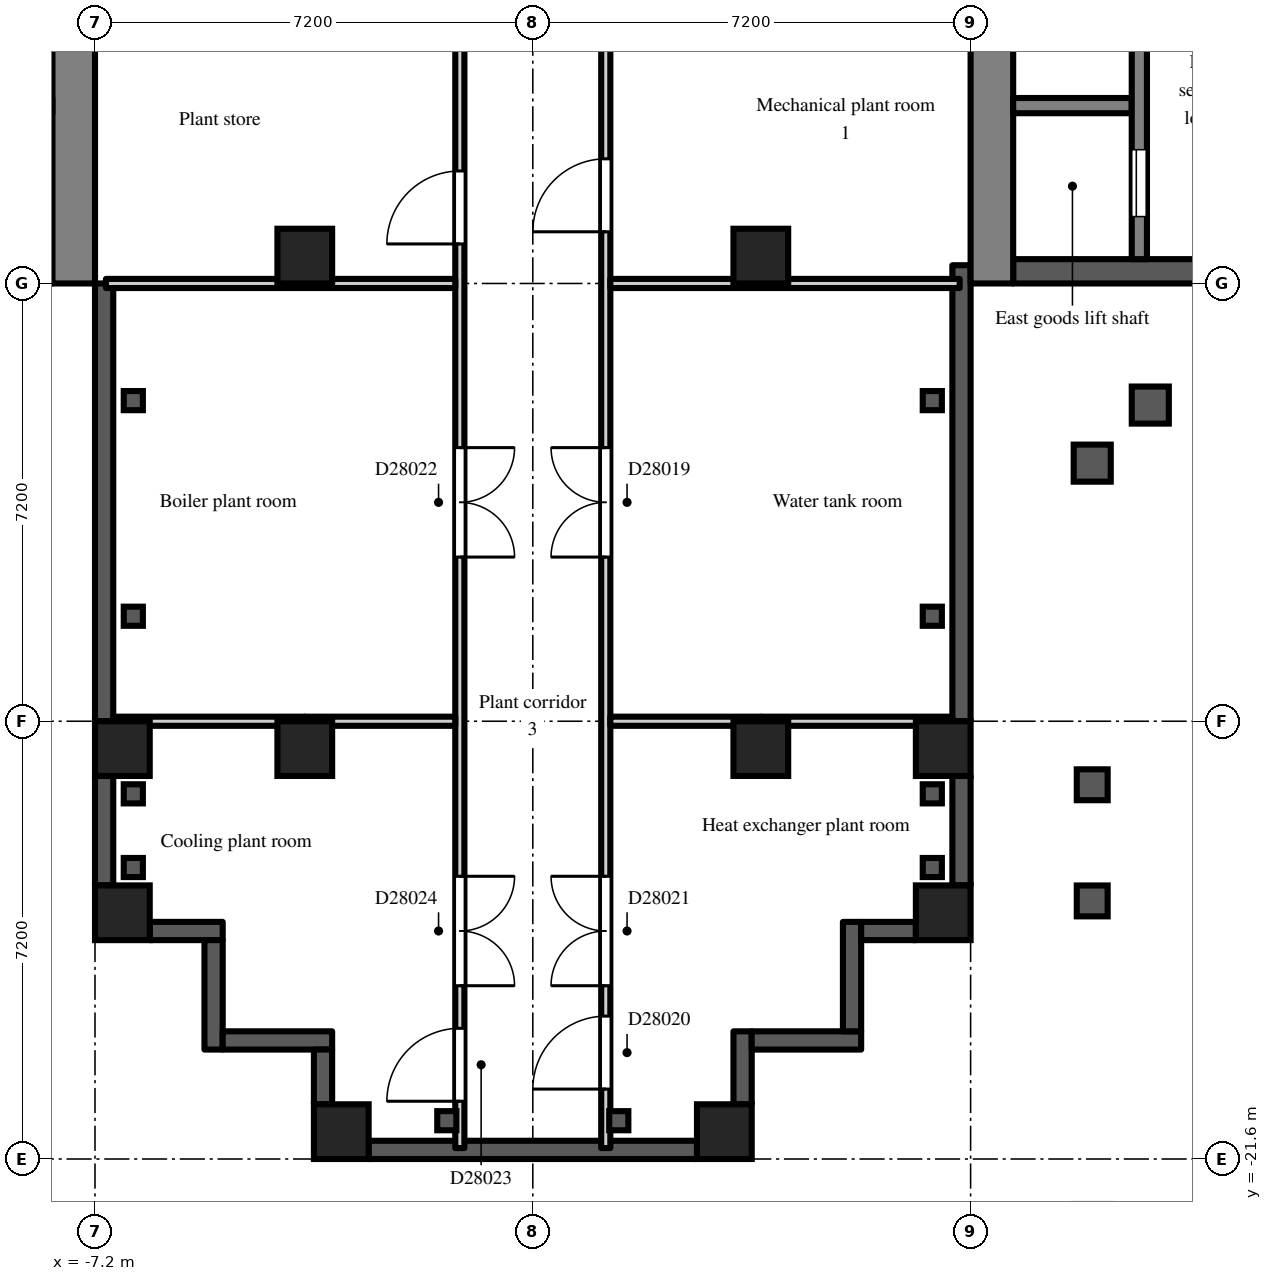
"""IFC4 building model, lengths in metres.
Left out: names, types, materials, properties, quantities, classifications, styles, units other than length and angle.
Written with IfcOpenShell. Run it as: python <this file> out.ifc"""

import sys

from ifc_helpers import new_model, si_unit, direction, frame, frame_2d, origin, origin_2d, place, context, subcontext, project, spatial, rectangle, extrude, element, fill, save


model = new_model("IFC4")
c1 = context("Model", 3, precision=1e-05, world=origin(), true_north=direction((0.0, 1.0)))
c2 = subcontext(c1, "Body", "Model", "MODEL_VIEW")
j1 = project(units=[si_unit("LENGTHUNIT", "METRE"), si_unit("PLANEANGLEUNIT", "RADIAN")], contexts=[c1])
p1 = place(None, origin())
s1 = spatial("IfcSite", under=j1, at=p1, CompositionType="ELEMENT")
p2 = place(p1, origin())
s2 = spatial("IfcBuilding", under=s1, at=p2, CompositionType="ELEMENT")
p3 = place(p2, frame((0.0, 0.0, 194.7)))
s3 = spatial("IfcBuildingStorey", under=s2, at=p3, CompositionType="ELEMENT", Elevation=194.7)
for number, where, z_axis, x_axis in (
    (1, (-6.75, -17.55, 0.0), (0.0, 0.0, 1.0), (1.0, 0.0, 0.0)),
    (2, (-6.75, -14.85, 0.0), (0.0, 0.0, 1.0), (1.0, 0.0, 0.0)),
    (3, (-3.75, -14.85, 0.0), (0.0, 0.0, 1.0), (1.0, 0.0, 0.0)),
    (4, (-3.75, -6.75, 0.0), (0.0, 0.0, 1.0), (1.0, 0.0, 0.0)),
    (5, (-3.15, -21.15, 0.0), (0.0, 0.0, 1.0), (1.0, 0.0, 0.0)),
    (6, (3.15, -21.15, 0.0), (0.0, 0.0, 1.0), (1.0, 0.0, 0.0)),
    (7, (3.75, -14.85, 0.0), (0.0, 0.0, 1.0), (1.0, 0.0, 0.0)),
    (8, (3.75, -6.75, 0.0), (0.0, 0.0, 1.0), (1.0, 0.0, 0.0)),
    (9, (6.75, -17.55, 0.0), (0.0, 0.0, 1.0), (1.0, 0.0, 0.0)),
    (10, (6.75, -14.85, 0.0), (0.0, 0.0, 1.0), (1.0, 0.0, 0.0)),
):
    element("IfcColumn", number, at=place(p3, frame(where, z_axis=z_axis, x_axis=x_axis)), inside=s3, PredefinedType="COLUMN", context=c2, shape_type="SweptSolid", body=[
        extrude(rectangle(XDim=0.9, YDim=0.9, at=origin_2d()), origin(), (0.0, 0.0, 1.0), 4.2),
    ])
p4 = place(p3, frame((-7.05, -7.2, 0.0), z_axis=(0.0, 0.0, 1.0), x_axis=(0.0, -1.0, 0.0)))
e11 = element("IfcWall", 11, at=p4, inside=s3, PredefinedType="SOLIDWALL", context=c2, shape_type="SweptSolid", body=[
    extrude(rectangle(XDim=7.2, YDim=0.3, at=frame_2d((3.6, 0.0))), origin(), (0.0, 0.0, 1.0), 3.8),
])
p5 = place(p3, frame((-7.05, -15.3, 0.0), z_axis=(0.0, 0.0, 1.0), x_axis=(0.0, -1.0, 0.0)))
e12 = element("IfcWall", 12, at=p5, inside=s3, PredefinedType="SOLIDWALL", context=c2, shape_type="SweptSolid", body=[
    extrude(rectangle(XDim=1.8, YDim=0.3, at=frame_2d((0.9, 0.0))), origin(), (0.0, 0.0, 1.0), 3.5),
])
p6 = place(p3, frame((-6.3, -17.85, 0.0), z_axis=(0.0, 0.0, 1.0), x_axis=(1.0, 0.0, 0.0)))
e13 = element("IfcWall", 13, at=p6, inside=s3, PredefinedType="SOLIDWALL", context=c2, shape_type="SweptSolid", body=[
    extrude(rectangle(XDim=1.2, YDim=0.3, at=frame_2d((0.6, 0.0))), origin(), (0.0, 0.0, 1.0), 3.8),
])
for number, where, z_axis, x_axis in (
    (14, (-5.25, -18.0, 0.0), (0.0, 0.0, 1.0), (0.0, -1.0, 0.0)),
    (15, (-5.1, -19.65, 0.0), (0.0, 0.0, 1.0), (1.0, 0.0, 0.0)),
):
    element("IfcWall", number, at=place(p3, frame(where, z_axis=z_axis, x_axis=x_axis)), inside=s3, PredefinedType="SOLIDWALL", context=c2, shape_type="SweptSolid", body=[
        extrude(rectangle(XDim=1.8, YDim=0.3, at=frame_2d((0.9, 0.0))), origin(), (0.0, 0.0, 1.0), 3.8),
    ])
p7 = place(p3, frame((-3.45, -19.8, 0.0), z_axis=(0.0, 0.0, 1.0), x_axis=(0.0, -1.0, 0.0)))
e16 = element("IfcWall", 16, at=p7, inside=s3, PredefinedType="SOLIDWALL", context=c2, shape_type="SweptSolid", body=[
    extrude(rectangle(XDim=0.9, YDim=0.3, at=frame_2d((0.45, 0.0))), origin(), (0.0, 0.0, 1.0), 3.8),
])
p8 = place(p3, frame((-2.7, -21.45, 0.0), z_axis=(0.0, 0.0, 1.0), x_axis=(1.0, 0.0, 0.0)))
e17 = element("IfcWall", 17, at=p8, inside=s3, PredefinedType="SOLIDWALL", context=c2, shape_type="SweptSolid", body=[
    extrude(rectangle(XDim=5.4, YDim=0.3, at=frame_2d((2.7, 0.0))), origin(), (0.0, 0.0, 1.0), 3.5),
])
p9 = place(p3, frame((3.45, -20.7, 0.0), z_axis=(0.0, 0.0, 1.0), x_axis=(0.0, 1.0, 0.0)))
e18 = element("IfcWall", 18, at=p9, inside=s3, PredefinedType="SOLIDWALL", context=c2, shape_type="SweptSolid", body=[
    extrude(rectangle(XDim=1.2, YDim=0.3, at=frame_2d((0.6, 0.0))), origin(), (0.0, 0.0, 1.0), 3.8),
])
p10 = place(p3, frame((3.6, -19.65, 0.0), z_axis=(0.0, 0.0, 1.0), x_axis=(1.0, 0.0, 0.0)))
e19 = element("IfcWall", 19, at=p10, inside=s3, PredefinedType="SOLIDWALL", context=c2, shape_type="SweptSolid", body=[
    extrude(rectangle(XDim=1.8, YDim=0.3, at=frame_2d((0.9, 0.0))), origin(), (0.0, 0.0, 1.0), 3.8),
])
p11 = place(p3, frame((5.25, -19.5, 0.0), z_axis=(0.0, 0.0, 1.0), x_axis=(0.0, 1.0, 0.0)))
e20 = element("IfcWall", 20, at=p11, inside=s3, PredefinedType="SOLIDWALL", context=c2, shape_type="SweptSolid", body=[
    extrude(rectangle(XDim=1.8, YDim=0.3, at=frame_2d((0.9, 0.0))), origin(), (0.0, 0.0, 1.0), 3.8),
])
p12 = place(p3, frame((5.4, -17.85, 0.0), z_axis=(0.0, 0.0, 1.0), x_axis=(1.0, 0.0, 0.0)))
e21 = element("IfcWall", 21, at=p12, inside=s3, PredefinedType="SOLIDWALL", context=c2, shape_type="SweptSolid", body=[
    extrude(rectangle(XDim=0.9, YDim=0.3, at=frame_2d((0.45, 0.0))), origin(), (0.0, 0.0, 1.0), 3.8),
])
p13 = place(p3, frame((7.05, -17.1, 0.0), z_axis=(0.0, 0.0, 1.0), x_axis=(0.0, 1.0, 0.0)))
e22 = element("IfcWall", 22, at=p13, inside=s3, PredefinedType="SOLIDWALL", context=c2, shape_type="SweptSolid", body=[
    extrude(rectangle(XDim=1.8, YDim=0.3, at=frame_2d((0.9, 0.0))), origin(), (0.0, 0.0, 1.0), 3.5),
])
p14 = place(p3, frame((7.05, -14.4, 0.0), z_axis=(0.0, 0.0, 1.0), x_axis=(0.0, 1.0, 0.0)))
e23 = element("IfcWall", 23, at=p14, inside=s3, PredefinedType="SOLIDWALL", context=c2, shape_type="SweptSolid", body=[
    extrude(rectangle(XDim=7.5, YDim=0.3, at=frame_2d((3.75, 0.0))), origin(), (0.0, 0.0, 1.0), 3.8),
])
p15 = place(p3, frame((7.55, -7.2, 0.0), z_axis=(0.0, 0.0, 1.0), x_axis=(0.0, 1.0, 0.0)))
e24 = element("IfcWall", 24, at=p15, inside=s3, PredefinedType="SHEAR", context=c2, shape_type="SweptSolid", body=[
    extrude(rectangle(XDim=14.4, YDim=0.7, at=frame_2d((7.2, 0.0))), origin(), (0.0, 0.0, 1.0), 3.8),
])
p16 = place(p15, frame((6.0, 0.0, 0.0)))
e25 = element("IfcOpeningElement", 25, at=p16, cuts=e24, PredefinedType="OPENING", context=c2, shape_type="SweptSolid", body=[
    extrude(rectangle(XDim=2.4, YDim=2.2, at=frame_2d((1.2, 1.1))), frame((0.0, 0.36, 0.0), z_axis=(0.0, -1.0, 0.0), x_axis=(1.0, 0.0, 0.0)), (0.0, 0.0, 1.0), 0.72),
])
p17 = place(p3, frame((7.9, -7.0, 0.0), z_axis=(0.0, 0.0, 1.0), x_axis=(1.0, 0.0, 0.0)))
e26 = element("IfcWall", 26, at=p17, inside=s3, PredefinedType="SHEAR", context=c2, shape_type="SweptSolid", body=[
    extrude(rectangle(XDim=12.95, YDim=0.4, at=frame_2d((6.475, 0.0))), origin(), (0.0, 0.0, 1.0), 3.8),
])
p18 = place(p3, frame((7.9, -4.275, 0.0), z_axis=(0.0, 0.0, 1.0), x_axis=(1.0, 0.0, 0.0)))
e27 = element("IfcWall", 27, at=p18, inside=s3, PredefinedType="SHEAR", context=c2, shape_type="SweptSolid", body=[
    extrude(rectangle(XDim=1.95, YDim=0.25, at=frame_2d((0.975, 0.0))), origin(), (0.0, 0.0, 1.0), 3.8),
])
p19 = place(p3, frame((9.975, -2.05, 0.0), z_axis=(0.0, 0.0, 1.0), x_axis=(0.0, -1.0, 0.0)))
e28 = element("IfcWall", 28, at=p19, inside=s3, PredefinedType="SHEAR", context=c2, shape_type="SweptSolid", body=[
    extrude(rectangle(XDim=4.75, YDim=0.25, at=frame_2d((2.375, 0.0))), origin(), (0.0, 0.0, 1.0), 3.8),
])
p20 = place(p19, frame((2.95, 0.0, 0.0)))
e29 = element("IfcOpeningElement", 29, at=p20, cuts=e28, PredefinedType="OPENING", context=c2, shape_type="SweptSolid", body=[
    extrude(rectangle(XDim=1.1, YDim=2.1, at=frame_2d((0.55, 1.05))), frame((0.0, 0.135, 0.0), z_axis=(0.0, -1.0, 0.0), x_axis=(1.0, 0.0, 0.0)), (0.0, 0.0, 1.0), 0.27),
])
p21 = place(p3, frame((-7.55, -7.2, 0.0), z_axis=(0.0, 0.0, 1.0), x_axis=(0.0, 1.0, 0.0)))
e30 = element("IfcWall", 30, at=p21, inside=s3, PredefinedType="SHEAR", context=c2, shape_type="SweptSolid", body=[
    extrude(rectangle(XDim=14.4, YDim=0.7, at=frame_2d((7.2, 0.0))), origin(), (0.0, 0.0, 1.0), 3.8),
])
p22 = place(p21, frame((6.0, 0.0, 0.0)))
e31 = element("IfcOpeningElement", 31, at=p22, cuts=e30, PredefinedType="OPENING", context=c2, shape_type="SweptSolid", body=[
    extrude(rectangle(XDim=2.4, YDim=2.2, at=frame_2d((1.2, 1.1))), frame((0.0, 0.36, 0.0), z_axis=(0.0, -1.0, 0.0), x_axis=(1.0, 0.0, 0.0)), (0.0, 0.0, 1.0), 0.72),
])
p23 = place(p3, frame((-6.9, -14.4, 0.0), z_axis=(0.0, 0.0, 1.0), x_axis=(1.0, 0.0, 0.0)))
e32 = element("IfcWall", 32, at=p23, inside=s3, PredefinedType="PARTITIONING", context=c2, shape_type="SweptSolid", body=[
    extrude(rectangle(XDim=3.15, YDim=0.15, at=frame_2d((1.575, 0.0))), origin(), (0.0, 0.0, 1.0), 3.5),
])
p24 = place(p3, frame((-7.02, -7.2, 0.0), z_axis=(0.0, 0.0, 1.0), x_axis=(1.0, 0.0, 0.0)))
e33 = element("IfcWall", 33, at=p24, inside=s3, PredefinedType="PARTITIONING", context=c2, shape_type="SweptSolid", body=[
    extrude(rectangle(XDim=3.27, YDim=0.15, at=frame_2d((1.635, 0.0))), origin(), (0.0, 0.0, 1.0), 3.5),
])
p25 = place(p3, frame((-1.2, -21.42, 0.0), z_axis=(0.0, 0.0, 1.0), x_axis=(0.0, 1.0, 0.0)))
e34 = element("IfcWall", 34, at=p25, inside=s3, PredefinedType="PARTITIONING", context=c2, shape_type="SweptSolid", body=[
    extrude(rectangle(XDim=20.295, YDim=0.15, at=frame_2d((10.147, 0.0))), origin(), (0.0, 0.0, 1.0), 3.8),
])
p26 = place(p25, frame((14.87, 0.0, 0.0)))
e35 = element("IfcOpeningElement", 35, at=p26, cuts=e34, PredefinedType="OPENING", context=c2, shape_type="SweptSolid", body=[
    extrude(rectangle(XDim=1.2, YDim=2.1, at=frame_2d((0.6, 1.05))), frame((0.0, 0.085, 0.0), z_axis=(0.0, -1.0, 0.0), x_axis=(1.0, 0.0, 0.0)), (0.0, 0.0, 1.0), 0.17),
])
p27 = place(p25, frame((19.22, 0.0, 0.0)))
e36 = element("IfcOpeningElement", 36, at=p27, cuts=e34, PredefinedType="OPENING", context=c2, shape_type="SweptSolid", body=[
    extrude(rectangle(XDim=0.9, YDim=2.1, at=frame_2d((0.45, 1.05))), frame((0.0, 0.085, 0.0), z_axis=(0.0, -1.0, 0.0), x_axis=(1.0, 0.0, 0.0)), (0.0, 0.0, 1.0), 0.17),
])
p28 = place(p25, frame((9.72, 0.0, 0.0)))
e37 = element("IfcOpeningElement", 37, at=p28, cuts=e34, PredefinedType="OPENING", context=c2, shape_type="SweptSolid", body=[
    extrude(rectangle(XDim=1.8, YDim=2.1, at=frame_2d((0.9, 1.05))), frame((0.0, 0.085, 0.0), z_axis=(0.0, -1.0, 0.0), x_axis=(1.0, 0.0, 0.0)), (0.0, 0.0, 1.0), 0.17),
])
p29 = place(p25, frame((0.77, 0.0, 0.0)))
e38 = element("IfcOpeningElement", 38, at=p29, cuts=e34, PredefinedType="OPENING", context=c2, shape_type="SweptSolid", body=[
    extrude(rectangle(XDim=1.2, YDim=2.1, at=frame_2d((0.6, 1.05))), frame((0.0, 0.085, 0.0), z_axis=(0.0, -1.0, 0.0), x_axis=(1.0, 0.0, 0.0)), (0.0, 0.0, 1.0), 0.17),
])
p30 = place(p25, frame((2.67, 0.0, 0.0)))
e39 = element("IfcOpeningElement", 39, at=p30, cuts=e34, PredefinedType="OPENING", context=c2, shape_type="SweptSolid", body=[
    extrude(rectangle(XDim=1.8, YDim=2.1, at=frame_2d((0.9, 1.05))), frame((0.0, 0.085, 0.0), z_axis=(0.0, -1.0, 0.0), x_axis=(1.0, 0.0, 0.0)), (0.0, 0.0, 1.0), 0.17),
])
p31 = place(p3, frame((1.2, -21.42, 0.0), z_axis=(0.0, 0.0, 1.0), x_axis=(0.0, 1.0, 0.0)))
e40 = element("IfcWall", 40, at=p31, inside=s3, PredefinedType="PARTITIONING", context=c2, shape_type="SweptSolid", body=[
    extrude(rectangle(XDim=20.295, YDim=0.15, at=frame_2d((10.147, 0.0))), origin(), (0.0, 0.0, 1.0), 3.8),
])
p32 = place(p31, frame((15.07, 0.0, 0.0)))
e41 = element("IfcOpeningElement", 41, at=p32, cuts=e40, PredefinedType="OPENING", context=c2, shape_type="SweptSolid", body=[
    extrude(rectangle(XDim=1.2, YDim=2.1, at=frame_2d((0.6, 1.05))), frame((0.0, 0.085, 0.0), z_axis=(0.0, -1.0, 0.0), x_axis=(1.0, 0.0, 0.0)), (0.0, 0.0, 1.0), 0.17),
])
p33 = place(p31, frame((9.72, 0.0, 0.0)))
e42 = element("IfcOpeningElement", 42, at=p33, cuts=e40, PredefinedType="OPENING", context=c2, shape_type="SweptSolid", body=[
    extrude(rectangle(XDim=1.8, YDim=2.1, at=frame_2d((0.9, 1.05))), frame((0.0, 0.085, 0.0), z_axis=(0.0, -1.0, 0.0), x_axis=(1.0, 0.0, 0.0)), (0.0, 0.0, 1.0), 0.17),
])
p34 = place(p31, frame((0.97, 0.0, 0.0)))
e43 = element("IfcOpeningElement", 43, at=p34, cuts=e40, PredefinedType="OPENING", context=c2, shape_type="SweptSolid", body=[
    extrude(rectangle(XDim=1.2, YDim=2.1, at=frame_2d((0.6, 1.05))), frame((0.0, 0.085, 0.0), z_axis=(0.0, -1.0, 0.0), x_axis=(1.0, 0.0, 0.0)), (0.0, 0.0, 1.0), 0.17),
])
p35 = place(p31, frame((2.67, 0.0, 0.0)))
e44 = element("IfcOpeningElement", 44, at=p35, cuts=e40, PredefinedType="OPENING", context=c2, shape_type="SweptSolid", body=[
    extrude(rectangle(XDim=1.8, YDim=2.1, at=frame_2d((0.9, 1.05))), frame((0.0, 0.085, 0.0), z_axis=(0.0, -1.0, 0.0), x_axis=(1.0, 0.0, 0.0)), (0.0, 0.0, 1.0), 0.17),
])
for number, where, z_axis, x_axis in (
    (45, (1.275, -14.4, 0.0), (0.0, 0.0, 1.0), (1.0, 0.0, 0.0)),
    (46, (1.275, -7.2, 0.0), (0.0, 0.0, 1.0), (1.0, 0.0, 0.0)),
    (47, (-3.75, -14.4, 0.0), (0.0, 0.0, 1.0), (1.0, 0.0, 0.0)),
    (48, (-3.75, -7.2, 0.0), (0.0, 0.0, 1.0), (1.0, 0.0, 0.0)),
):
    element("IfcWall", number, at=place(p3, frame(where, z_axis=z_axis, x_axis=x_axis)), inside=s3, PredefinedType="PARTITIONING", context=c2, shape_type="SweptSolid", body=[
        extrude(rectangle(XDim=2.475, YDim=0.15, at=frame_2d((1.238, 0.0))), origin(), (0.0, 0.0, 1.0), 3.8),
    ])
p36 = place(p3, frame((3.75, -14.4, 0.0), z_axis=(0.0, 0.0, 1.0), x_axis=(1.0, 0.0, 0.0)))
e49 = element("IfcWall", 49, at=p36, inside=s3, PredefinedType="PARTITIONING", context=c2, shape_type="SweptSolid", body=[
    extrude(rectangle(XDim=3.15, YDim=0.15, at=frame_2d((1.575, 0.0))), origin(), (0.0, 0.0, 1.0), 3.5),
])
p37 = place(p3, frame((3.75, -7.2, 0.0), z_axis=(0.0, 0.0, 1.0), x_axis=(1.0, 0.0, 0.0)))
e50 = element("IfcWall", 50, at=p37, inside=s3, PredefinedType="PARTITIONING", context=c2, shape_type="SweptSolid", body=[
    extrude(rectangle(XDim=3.27, YDim=0.15, at=frame_2d((1.635, 0.0))), origin(), (0.0, 0.0, 1.0), 3.5),
])
p38 = place(p20, origin())
e51 = element("IfcDoor", 51, at=p38, inside=s3, OperationType="SLIDING_TO_LEFT", PredefinedType="DOOR", context=c2, shape_type="SweptSolid", body=[
    extrude(rectangle(XDim=1.1, YDim=2.1, at=frame_2d((0.55, 1.05))), frame((0.0, 0.025, 0.0), z_axis=(0.0, -1.0, 0.0), x_axis=(1.0, 0.0, 0.0)), (0.0, 0.0, 1.0), 0.05),
])
fill(e29, e51)
p39 = place(p26, origin())
e52 = element("IfcDoor", 52, at=p39, inside=s3, OperationType="SINGLE_SWING_LEFT", PredefinedType="DOOR", context=c2, shape_type="SweptSolid", body=[
    extrude(rectangle(XDim=1.2, YDim=2.1, at=frame_2d((0.6, 1.05))), frame((0.0, 0.025, 0.0), z_axis=(0.0, -1.0, 0.0), x_axis=(1.0, 0.0, 0.0)), (0.0, 0.0, 1.0), 0.05),
])
fill(e35, e52)
p40 = place(p32, origin())
e53 = element("IfcDoor", 53, at=p40, inside=s3, OperationType="SINGLE_SWING_LEFT", PredefinedType="DOOR", context=c2, shape_type="SweptSolid", body=[
    extrude(rectangle(XDim=1.2, YDim=2.1, at=frame_2d((0.6, 1.05))), frame((0.0, 0.025, 0.0), z_axis=(0.0, -1.0, 0.0), x_axis=(1.0, 0.0, 0.0)), (0.0, 0.0, 1.0), 0.05),
])
fill(e41, e53)
p41 = place(p33, origin())
e54 = element("IfcDoor", 54, at=p41, inside=s3, OperationType="DOUBLE_DOOR_DOUBLE_SWING", PredefinedType="DOOR", context=c2, shape_type="SweptSolid", body=[
    extrude(rectangle(XDim=1.8, YDim=2.1, at=frame_2d((0.9, 1.05))), frame((0.0, 0.025, 0.0), z_axis=(0.0, -1.0, 0.0), x_axis=(1.0, 0.0, 0.0)), (0.0, 0.0, 1.0), 0.05),
])
fill(e42, e54)
p42 = place(p34, origin())
e55 = element("IfcDoor", 55, at=p42, inside=s3, OperationType="SINGLE_SWING_LEFT", PredefinedType="DOOR", context=c2, shape_type="SweptSolid", body=[
    extrude(rectangle(XDim=1.2, YDim=2.1, at=frame_2d((0.6, 1.05))), frame((0.0, 0.025, 0.0), z_axis=(0.0, -1.0, 0.0), x_axis=(1.0, 0.0, 0.0)), (0.0, 0.0, 1.0), 0.05),
])
fill(e43, e55)
p43 = place(p35, origin())
e56 = element("IfcDoor", 56, at=p43, inside=s3, OperationType="DOUBLE_DOOR_DOUBLE_SWING", PredefinedType="DOOR", context=c2, shape_type="SweptSolid", body=[
    extrude(rectangle(XDim=1.8, YDim=2.1, at=frame_2d((0.9, 1.05))), frame((0.0, 0.025, 0.0), z_axis=(0.0, -1.0, 0.0), x_axis=(1.0, 0.0, 0.0)), (0.0, 0.0, 1.0), 0.05),
])
fill(e44, e56)
p44 = place(p28, frame((1.8, 0.0, 0.0), z_axis=(0.0, 0.0, 1.0), x_axis=(-1.0, 0.0, 0.0)))
e57 = element("IfcDoor", 57, at=p44, inside=s3, OperationType="DOUBLE_DOOR_DOUBLE_SWING", PredefinedType="DOOR", context=c2, shape_type="SweptSolid", body=[
    extrude(rectangle(XDim=1.8, YDim=2.1, at=frame_2d((0.9, 1.05))), frame((0.0, 0.025, 0.0), z_axis=(0.0, -1.0, 0.0), x_axis=(1.0, 0.0, 0.0)), (0.0, 0.0, 1.0), 0.05),
])
fill(e37, e57)
p45 = place(p29, origin())
e58 = element("IfcDoor", 58, at=p45, inside=s3, OperationType="SINGLE_SWING_LEFT", PredefinedType="DOOR", context=c2, shape_type="SweptSolid", body=[
    extrude(rectangle(XDim=1.2, YDim=2.1, at=frame_2d((0.6, 1.05))), frame((0.0, 0.025, 0.0), z_axis=(0.0, -1.0, 0.0), x_axis=(1.0, 0.0, 0.0)), (0.0, 0.0, 1.0), 0.05),
])
fill(e38, e58)
p46 = place(p30, frame((1.8, 0.0, 0.0), z_axis=(0.0, 0.0, 1.0), x_axis=(-1.0, 0.0, 0.0)))
e59 = element("IfcDoor", 59, at=p46, inside=s3, OperationType="DOUBLE_DOOR_DOUBLE_SWING", PredefinedType="DOOR", context=c2, shape_type="SweptSolid", body=[
    extrude(rectangle(XDim=1.8, YDim=2.1, at=frame_2d((0.9, 1.05))), frame((0.0, 0.025, 0.0), z_axis=(0.0, -1.0, 0.0), x_axis=(1.0, 0.0, 0.0)), (0.0, 0.0, 1.0), 0.05),
])
fill(e39, e59)
save(model, sys.argv[1])
